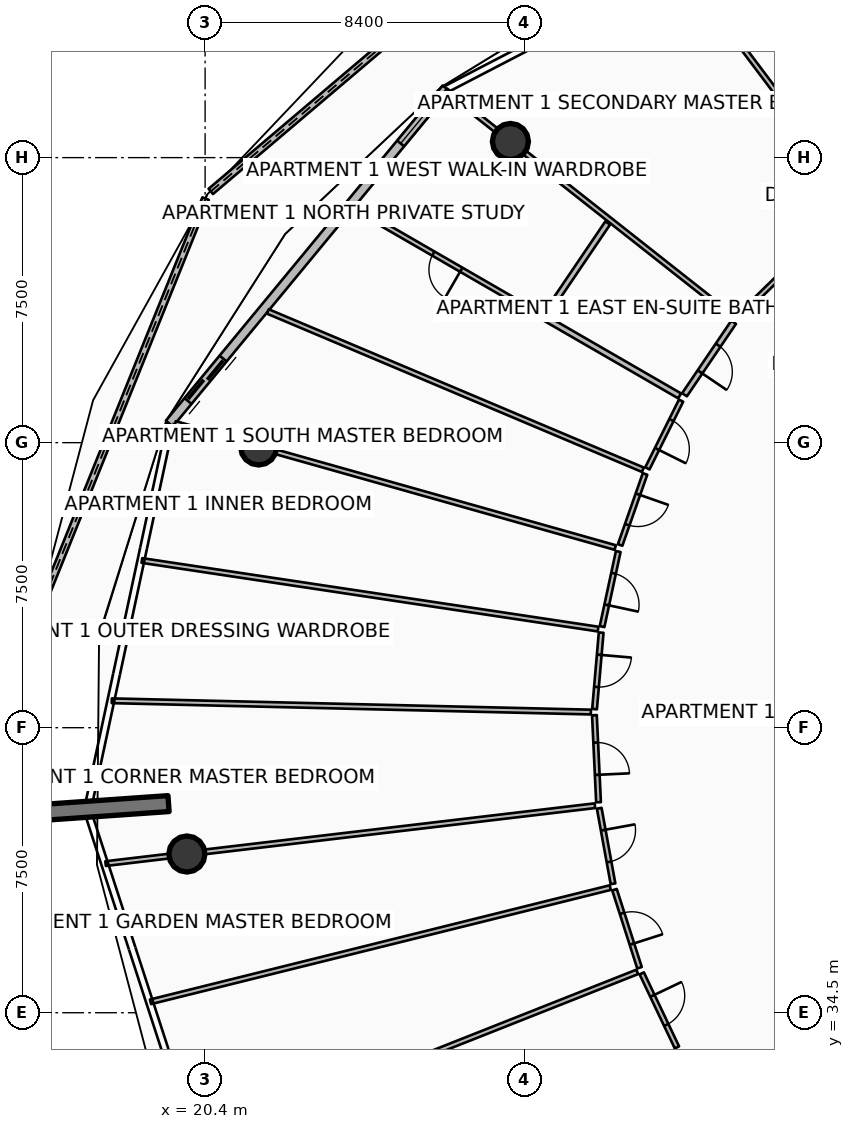
"""IFC4 building model, lengths in metres.
Left out: names, types, materials, properties, quantities, classifications, styles, units other than length and angle.
Written with IfcOpenShell. Run it as: python <this file> out.ifc"""

import sys

from ifc_helpers import new_model, si_unit, direction, frame, frame_2d, origin, origin_2d, place, context, subcontext, project, spatial, polyline, rectangle, circle, outline, extrude, element, fill, save


model = new_model("IFC4")
c1 = context("Model", 3, precision=1e-05, world=origin(), true_north=direction((0.0, 1.0)))
c2 = subcontext(c1, "Body", "Model", "MODEL_VIEW")
j1 = project(units=[si_unit("LENGTHUNIT", "METRE"), si_unit("PLANEANGLEUNIT", "RADIAN")], contexts=[c1])
p1 = place(None, origin())
s1 = spatial("IfcSite", under=j1, at=p1, CompositionType="ELEMENT")
p2 = place(p1, origin())
s2 = spatial("IfcBuilding", under=s1, at=p2, CompositionType="ELEMENT")
p3 = place(p2, frame((0.0, 0.0, 271.35)))
s3 = spatial("IfcBuildingStorey", under=s2, at=p3, CompositionType="ELEMENT", Elevation=271.35)
p4 = place(p3, frame((19.438, 40.003, 0.0), z_axis=(0.0, 0.0, 1.0), x_axis=(-0.997563824095, -0.069759707979, 0.0)))
e1 = element("IfcWall", 1, at=p4, inside=s3, PredefinedType="SOLIDWALL", context=c2, shape_type="SweptSolid", body=[
    extrude(rectangle(XDim=3.5, YDim=0.42, at=frame_2d((1.75, 0.0))), origin(), (0.0, 0.0, 1.0), 3.85),
])
for number, where, z_axis, x_axis in (
    (2, (28.434, 57.425, 0.0), (0.0, 0.0, 1.0), (1.0, 0.0, 0.0)),
    (3, (21.809, 49.387, 0.0), (0.0, 0.0, 1.0), (1.0, 0.0, 0.0)),
    (4, (19.92, 38.677, 0.0), (0.0, 0.0, 1.0), (1.0, 0.0, 0.0)),
):
    element("IfcColumn", number, at=place(p3, frame(where, z_axis=z_axis, x_axis=x_axis)), inside=s3, PredefinedType="COLUMN", context=c2, shape_type="SweptSolid", body=[
        extrude(circle(Radius=0.475, at=origin_2d()), origin(), (0.0, 0.0, 1.0), 3.59),
    ])
p5 = place(p3, frame((29.348, 63.571, 0.0), z_axis=(0.0, 0.0, 1.0), x_axis=(-0.762735629532, -0.646710413896, 0.0)))
e5 = element("IfcWall", 5, at=p5, inside=s3, PredefinedType="PARAPET", context=c2, shape_type="SweptSolid", body=[
    extrude(outline(polyline([(0.0, 0.0), (11.535, 0.0), (11.535, 1.632), (5.768, 1.798), (0.0, 1.86), (0.0, 0.0)])), frame((0.0, 0.09, 0.0), z_axis=(0.0, -1.0, 0.0), x_axis=(1.0, 0.0, 0.0)), (0.0, 0.0, 1.0), 0.18),
])
p6 = place(p3, frame((20.413, 55.922, 0.0), z_axis=(0.0, 0.0, 1.0), x_axis=(-0.374094279698, -0.927390678138, 0.0)))
e6 = element("IfcWall", 6, at=p6, inside=s3, PredefinedType="PARAPET", context=c2, shape_type="SweptSolid", body=[
    extrude(outline(polyline([(0.0, 0.0), (12.075, 0.0), (12.075, 1.233), (6.037, 1.418), (0.0, 1.632), (0.0, 0.0)])), frame((0.0, 0.09, 0.0), z_axis=(0.0, -1.0, 0.0), x_axis=(1.0, 0.0, 0.0)), (0.0, 0.0, 1.0), 0.18),
])
p7 = place(p3, frame((26.742, 58.822, 0.0), z_axis=(0.0, 0.0, 1.0), x_axis=(-0.636680093065, -0.771128043255, 0.0)))
e7 = element("IfcWall", 7, at=p7, inside=s3, PredefinedType="SOLIDWALL", context=c2, shape_type="SweptSolid", body=[
    extrude(rectangle(XDim=11.438, YDim=0.24, at=frame_2d((5.719, 0.0))), origin(), (0.0, 0.0, 1.0), 2.54),
])
p8 = place(p7, frame((9.218, 0.0, 0.0)))
e8 = element("IfcOpeningElement", 8, at=p8, cuts=e7, PredefinedType="OPENING", context=c2, shape_type="SweptSolid", body=[
    extrude(rectangle(XDim=1.45, YDim=2.15, at=frame_2d((0.725, 1.075))), frame((0.0, 0.13, 0.0), z_axis=(0.0, -1.0, 0.0), x_axis=(1.0, 0.0, 0.0)), (0.0, 0.0, 1.0), 0.26),
])
p9 = place(p7, frame((0.28, 0.0, 0.65)))
e9 = element("IfcOpeningElement", 9, at=p9, cuts=e7, PredefinedType="OPENING", context=c2, shape_type="SweptSolid", body=[
    extrude(rectangle(XDim=1.6, YDim=1.5, at=frame_2d((0.8, 0.75))), frame((0.0, 0.13, 0.0), z_axis=(0.0, -1.0, 0.0), x_axis=(1.0, 0.0, 0.0)), (0.0, 0.0, 1.0), 0.26),
])
p10 = place(p3, frame((37.509, 55.949, 0.0), z_axis=(0.0, 0.0, 1.0), x_axis=(-0.60104674722, 0.799213868534, 0.0)))
e10 = element("IfcWall", 10, at=p10, inside=s3, PredefinedType="PARTITIONING", context=c2, shape_type="SweptSolid", body=[
    extrude(rectangle(XDim=7.572, YDim=0.125, at=frame_2d((3.786, 0.0))), origin(), (0.0, 0.0, 1.0), 3.03),
])
p11 = place(p3, frame((37.506, 55.822, 0.0), z_axis=(0.0, 0.0, 1.0), x_axis=(-0.715105814901, -0.699016218334, 0.0)))
e11 = element("IfcWall", 11, at=p11, inside=s3, PredefinedType="PARTITIONING", context=c2, shape_type="SweptSolid", body=[
    extrude(rectangle(XDim=4.294, YDim=0.125, at=frame_2d((2.147, 0.0))), origin(), (0.0, 0.0, 1.0), 2.957),
])
p12 = place(p11, frame((1.697, 0.0, 0.0)))
e12 = element("IfcOpeningElement", 12, at=p12, cuts=e11, PredefinedType="OPENING", context=c2, shape_type="SweptSolid", body=[
    extrude(rectangle(XDim=0.9, YDim=2.08, at=frame_2d((0.45, 1.04))), frame((0.0, 0.073, 0.0), z_axis=(0.0, -1.0, 0.0), x_axis=(1.0, 0.0, 0.0)), (0.0, 0.0, 1.0), 0.145),
])
p13 = place(p3, frame((34.285, 52.812, 0.0), z_axis=(0.0, 0.0, 1.0), x_axis=(-0.785324921183, 0.619083813526, 0.0)))
e13 = element("IfcWall", 13, at=p13, inside=s3, PredefinedType="PARTITIONING", context=c2, shape_type="SweptSolid", body=[
    extrude(rectangle(XDim=9.621, YDim=0.125, at=frame_2d((4.811, 0.0))), origin(), (0.0, 0.0, 1.0), 2.957),
])
p14 = place(p3, frame((34.308, 52.667, 0.0), z_axis=(0.0, 0.0, 1.0), x_axis=(-0.561141072409, -0.827720180288, 0.0)))
e14 = element("IfcWall", 14, at=p14, inside=s3, PredefinedType="PARTITIONING", context=c2, shape_type="SweptSolid", body=[
    extrude(rectangle(XDim=2.303, YDim=0.15, at=frame_2d((1.152, 0.0))), origin(), (0.0, 0.0, 1.0), 2.957),
])
p15 = place(p14, frame((0.727, 0.0, 0.0)))
e15 = element("IfcOpeningElement", 15, at=p15, cuts=e14, PredefinedType="OPENING", context=c2, shape_type="SweptSolid", body=[
    extrude(rectangle(XDim=0.85, YDim=2.06, at=frame_2d((0.425, 1.03))), frame((0.0, 0.085, 0.0), z_axis=(0.0, -1.0, 0.0), x_axis=(1.0, 0.0, 0.0)), (0.0, 0.0, 1.0), 0.17),
])
p16 = place(p3, frame((30.994, 55.28, 0.0), z_axis=(0.0, 0.0, 1.0), x_axis=(-0.561093021969, -0.827752753361, 0.0)))
e16 = element("IfcWall", 16, at=p16, inside=s3, PredefinedType="PARTITIONING", context=c2, shape_type="SweptSolid", body=[
    extrude(rectangle(XDim=2.91, YDim=0.15, at=frame_2d((1.455, 0.0))), origin(), (0.0, 0.0, 1.0), 2.957),
])
p17 = place(p3, frame((32.887, 50.731, 0.0), z_axis=(0.0, 0.0, 1.0), x_axis=(-0.865897249189, 0.500221904605, 0.0)))
e17 = element("IfcWall", 17, at=p17, inside=s3, PredefinedType="PARTITIONING", context=c2, shape_type="SweptSolid", body=[
    extrude(rectangle(XDim=4.09, YDim=0.15, at=frame_2d((2.045, 0.0))), origin(), (0.0, 0.0, 1.0), 3.03),
])
p18 = place(p3, frame((29.233, 52.842, 0.0), z_axis=(0.0, 0.0, 1.0), x_axis=(-0.865885749935, 0.500241809588, 0.0)))
e18 = element("IfcWall", 18, at=p18, inside=s3, PredefinedType="PARTITIONING", context=c2, shape_type="SweptSolid", body=[
    extrude(rectangle(XDim=5.683, YDim=0.125, at=frame_2d((2.841, 0.0))), origin(), (0.0, 0.0, 1.0), 3.03),
])
p19 = place(p18, frame((2.417, 0.0, 0.0)))
e19 = element("IfcOpeningElement", 19, at=p19, cuts=e18, PredefinedType="OPENING", context=c2, shape_type="SweptSolid", body=[
    extrude(rectangle(XDim=0.85, YDim=2.06, at=frame_2d((0.425, 1.03))), frame((0.0, 0.073, 0.0), z_axis=(0.0, -1.0, 0.0), x_axis=(1.0, 0.0, 0.0)), (0.0, 0.0, 1.0), 0.145),
])
p20 = place(p3, frame((31.92, 48.787, 0.0), z_axis=(0.0, 0.0, 1.0), x_axis=(-0.92130726737, 0.388835336731, 0.0)))
e20 = element("IfcWall", 20, at=p20, inside=s3, PredefinedType="PARTITIONING", context=c2, shape_type="SweptSolid", body=[
    extrude(rectangle(XDim=10.712, YDim=0.125, at=frame_2d((5.356, 0.0))), origin(), (0.0, 0.0, 1.0), 3.03),
])
p21 = place(p3, frame((32.925, 50.605, 0.0), z_axis=(0.0, 0.0, 1.0), x_axis=(-0.445446150764, -0.895308732656, 0.0)))
e21 = element("IfcWall", 21, at=p21, inside=s3, PredefinedType="PARTITIONING", context=c2, shape_type="SweptSolid", body=[
    extrude(rectangle(XDim=1.99, YDim=0.125, at=frame_2d((0.995, 0.0))), origin(), (0.0, 0.0, 1.0), 3.03),
])
p22 = place(p21, frame((0.57, 0.0, 0.0)))
e22 = element("IfcOpeningElement", 22, at=p22, cuts=e21, PredefinedType="OPENING", context=c2, shape_type="SweptSolid", body=[
    extrude(rectangle(XDim=0.85, YDim=2.06, at=frame_2d((0.425, 1.03))), frame((0.0, 0.073, 0.0), z_axis=(0.0, -1.0, 0.0), x_axis=(1.0, 0.0, 0.0)), (0.0, 0.0, 1.0), 0.145),
])
p23 = place(p3, frame((31.976, 48.677, 0.0), z_axis=(0.0, 0.0, 1.0), x_axis=(-0.330762244327, -0.943714118644, 0.0)))
e23 = element("IfcWall", 23, at=p23, inside=s3, PredefinedType="PARTITIONING", context=c2, shape_type="SweptSolid", body=[
    extrude(rectangle(XDim=1.98, YDim=0.125, at=frame_2d((0.99, 0.0))), origin(), (0.0, 0.0, 1.0), 2.957),
])
p24 = place(p23, frame((0.565, 0.0, 0.0)))
e24 = element("IfcOpeningElement", 24, at=p24, cuts=e23, PredefinedType="OPENING", context=c2, shape_type="SweptSolid", body=[
    extrude(rectangle(XDim=0.85, YDim=2.06, at=frame_2d((0.425, 1.03))), frame((0.0, 0.073, 0.0), z_axis=(0.0, -1.0, 0.0), x_axis=(1.0, 0.0, 0.0)), (0.0, 0.0, 1.0), 0.145),
])
p25 = place(p3, frame((31.192, 46.74, 0.0), z_axis=(0.0, 0.0, 1.0), x_axis=(-0.962454841417, 0.271441850554, 0.0)))
e25 = element("IfcWall", 25, at=p25, inside=s3, PredefinedType="PARTITIONING", context=c2, shape_type="SweptSolid", body=[
    extrude(rectangle(XDim=12.031, YDim=0.125, at=frame_2d((6.016, 0.0))), origin(), (0.0, 0.0, 1.0), 2.957),
])
p26 = place(p3, frame((30.74, 44.595, 0.0), z_axis=(0.0, 0.0, 1.0), x_axis=(-0.988886285118, 0.148673854813, 0.0)))
e26 = element("IfcWall", 26, at=p26, inside=s3, PredefinedType="PARTITIONING", context=c2, shape_type="SweptSolid", body=[
    extrude(rectangle(XDim=12.139, YDim=0.125, at=frame_2d((6.069, 0.0))), origin(), (0.0, 0.0, 1.0), 3.03),
])
p27 = place(p3, frame((30.551, 42.411, 0.0), z_axis=(0.0, 0.0, 1.0), x_axis=(-0.999722360085, 0.023562740626, 0.0)))
e27 = element("IfcWall", 27, at=p27, inside=s3, PredefinedType="PARTITIONING", context=c2, shape_type="SweptSolid", body=[
    extrude(rectangle(XDim=12.61, YDim=0.125, at=frame_2d((6.305, 0.0))), origin(), (0.0, 0.0, 1.0), 3.03),
])
p28 = place(p3, frame((31.271, 46.635, 0.0), z_axis=(0.0, 0.0, 1.0), x_axis=(-0.210477911791, -0.97759861326, 0.0)))
e28 = element("IfcWall", 28, at=p28, inside=s3, PredefinedType="PARTITIONING", context=c2, shape_type="SweptSolid", body=[
    extrude(rectangle(XDim=2.021, YDim=0.125, at=frame_2d((1.01, 0.0))), origin(), (0.0, 0.0, 1.0), 2.957),
])
p29 = place(p28, frame((0.585, 0.0, 0.0)))
e29 = element("IfcOpeningElement", 29, at=p29, cuts=e28, PredefinedType="OPENING", context=c2, shape_type="SweptSolid", body=[
    extrude(rectangle(XDim=0.85, YDim=2.06, at=frame_2d((0.425, 1.03))), frame((0.0, 0.073, 0.0), z_axis=(0.0, -1.0, 0.0), x_axis=(1.0, 0.0, 0.0)), (0.0, 0.0, 1.0), 0.145),
])
p30 = place(p3, frame((30.822, 44.502, 0.0), z_axis=(0.0, 0.0, 1.0), x_axis=(-0.086275045339, -0.996271356886, 0.0)))
e30 = element("IfcWall", 30, at=p30, inside=s3, PredefinedType="PARTITIONING", context=c2, shape_type="SweptSolid", body=[
    extrude(rectangle(XDim=2.021, YDim=0.125, at=frame_2d((1.01, 0.0))), origin(), (0.0, 0.0, 1.0), 3.03),
])
p31 = place(p30, frame((0.585, 0.0, 0.0)))
e31 = element("IfcOpeningElement", 31, at=p31, cuts=e30, PredefinedType="OPENING", context=c2, shape_type="SweptSolid", body=[
    extrude(rectangle(XDim=0.85, YDim=2.06, at=frame_2d((0.425, 1.03))), frame((0.0, 0.073, 0.0), z_axis=(0.0, -1.0, 0.0), x_axis=(1.0, 0.0, 0.0)), (0.0, 0.0, 1.0), 0.145),
])
p32 = place(p3, frame((30.645, 42.329, 0.0), z_axis=(0.0, 0.0, 1.0), x_axis=(0.047175561804, -0.998886613369, 0.0)))
e32 = element("IfcWall", 32, at=p32, inside=s3, PredefinedType="PARTITIONING", context=c2, shape_type="SweptSolid", body=[
    extrude(rectangle(XDim=2.292, YDim=0.125, at=frame_2d((1.146, 0.0))), origin(), (0.0, 0.0, 1.0), 2.957),
])
p33 = place(p32, frame((0.721, 0.0, 0.0)))
e33 = element("IfcOpeningElement", 33, at=p33, cuts=e32, PredefinedType="OPENING", context=c2, shape_type="SweptSolid", body=[
    extrude(rectangle(XDim=0.85, YDim=2.06, at=frame_2d((0.425, 1.03))), frame((0.0, 0.073, 0.0), z_axis=(0.0, -1.0, 0.0), x_axis=(1.0, 0.0, 0.0)), (0.0, 0.0, 1.0), 0.145),
])
p34 = place(p3, frame((30.657, 39.947, 0.0), z_axis=(0.0, 0.0, 1.0), x_axis=(-0.99306861519, -0.117536060525, 0.0)))
e34 = element("IfcWall", 34, at=p34, inside=s3, PredefinedType="PARTITIONING", context=c2, shape_type="SweptSolid", body=[
    extrude(rectangle(XDim=12.966, YDim=0.125, at=frame_2d((6.483, 0.0))), origin(), (0.0, 0.0, 1.0), 2.957),
])
p35 = place(p3, frame((31.061, 37.792, 0.0), z_axis=(0.0, 0.0, 1.0), x_axis=(-0.970505468857, -0.241079105105, 0.0)))
e35 = element("IfcWall", 35, at=p35, inside=s3, PredefinedType="PARTITIONING", context=c2, shape_type="SweptSolid", body=[
    extrude(rectangle(XDim=12.465, YDim=0.125, at=frame_2d((6.233, 0.0))), origin(), (0.0, 0.0, 1.0), 3.03),
])
p36 = place(p3, frame((31.772, 35.575, 0.0), z_axis=(0.0, 0.0, 1.0), x_axis=(-0.929777389871, -0.368122269476, 0.0)))
e36 = element("IfcWall", 36, at=p36, inside=s3, PredefinedType="PARTITIONING", context=c2, shape_type="SweptSolid", body=[
    extrude(rectangle(XDim=12.45, YDim=0.125, at=frame_2d((6.225, 0.0))), origin(), (0.0, 0.0, 1.0), 3.03),
])
p37 = place(p3, frame((30.771, 39.88, 0.0), z_axis=(0.0, 0.0, 1.0), x_axis=(0.17966153972, -0.983728484464, 0.0)))
e37 = element("IfcWall", 37, at=p37, inside=s3, PredefinedType="PARTITIONING", context=c2, shape_type="SweptSolid", body=[
    extrude(rectangle(XDim=2.021, YDim=0.125, at=frame_2d((1.01, 0.0))), origin(), (0.0, 0.0, 1.0), 2.957),
])
p38 = place(p37, frame((0.585, 0.0, 0.0)))
e38 = element("IfcOpeningElement", 38, at=p38, cuts=e37, PredefinedType="OPENING", context=c2, shape_type="SweptSolid", body=[
    extrude(rectangle(XDim=0.85, YDim=2.06, at=frame_2d((0.425, 1.03))), frame((0.0, 0.073, 0.0), z_axis=(0.0, -1.0, 0.0), x_axis=(1.0, 0.0, 0.0)), (0.0, 0.0, 1.0), 0.145),
])
p39 = place(p3, frame((31.173, 37.738, 0.0), z_axis=(0.0, 0.0, 1.0), x_axis=(0.305305543728, -0.952254443397, 0.0)))
e39 = element("IfcWall", 39, at=p39, inside=s3, PredefinedType="PARTITIONING", context=c2, shape_type="SweptSolid", body=[
    extrude(rectangle(XDim=2.157, YDim=0.125, at=frame_2d((1.078, 0.0))), origin(), (0.0, 0.0, 1.0), 3.03),
])
p40 = place(p39, frame((0.653, 0.0, 0.0)))
e40 = element("IfcOpeningElement", 40, at=p40, cuts=e39, PredefinedType="OPENING", context=c2, shape_type="SweptSolid", body=[
    extrude(rectangle(XDim=0.85, YDim=2.06, at=frame_2d((0.425, 1.03))), frame((0.0, 0.073, 0.0), z_axis=(0.0, -1.0, 0.0), x_axis=(1.0, 0.0, 0.0)), (0.0, 0.0, 1.0), 0.145),
])
p41 = place(p3, frame((31.89, 35.536, 0.0), z_axis=(0.0, 0.0, 1.0), x_axis=(0.429375439277, -0.90312608873, 0.0)))
e41 = element("IfcWall", 41, at=p41, inside=s3, PredefinedType="PARTITIONING", context=c2, shape_type="SweptSolid", body=[
    extrude(rectangle(XDim=2.157, YDim=0.125, at=frame_2d((1.078, 0.0))), origin(), (0.0, 0.0, 1.0), 2.957),
])
p42 = place(p41, frame((0.653, 0.0, 0.0)))
e42 = element("IfcOpeningElement", 42, at=p42, cuts=e41, PredefinedType="OPENING", context=c2, shape_type="SweptSolid", body=[
    extrude(rectangle(XDim=0.85, YDim=2.06, at=frame_2d((0.425, 1.03))), frame((0.0, 0.073, 0.0), z_axis=(0.0, -1.0, 0.0), x_axis=(1.0, 0.0, 0.0)), (0.0, 0.0, 1.0), 0.145),
])
p43 = place(p8, origin())
e43 = element("IfcDoor", 43, at=p43, inside=s3, OperationType="DOUBLE_DOOR_SLIDING", PredefinedType="DOOR", context=c2, shape_type="SweptSolid", body=[
    extrude(rectangle(XDim=1.45, YDim=2.15, at=frame_2d((0.725, 1.075))), frame((0.0, 0.025, 0.0), z_axis=(0.0, -1.0, 0.0), x_axis=(1.0, 0.0, 0.0)), (0.0, 0.0, 1.0), 0.05),
])
fill(e8, e43)
p44 = place(p9, origin())
e44 = element("IfcWindow", 44, at=p44, inside=s3, PartitioningType="SINGLE_PANEL", PredefinedType="WINDOW", context=c2, shape_type="SweptSolid", body=[
    extrude(rectangle(XDim=1.6, YDim=1.5, at=frame_2d((0.8, 0.75))), frame((0.0, 0.03, 0.0), z_axis=(0.0, -1.0, 0.0), x_axis=(1.0, 0.0, 0.0)), (0.0, 0.0, 1.0), 0.06),
])
fill(e9, e44)
p45 = place(p15, origin())
e45 = element("IfcDoor", 45, at=p45, inside=s3, OperationType="SINGLE_SWING_RIGHT", PredefinedType="DOOR", context=c2, shape_type="SweptSolid", body=[
    extrude(rectangle(XDim=0.85, YDim=2.06, at=frame_2d((0.425, 1.03))), frame((0.0, 0.025, 0.0), z_axis=(0.0, -1.0, 0.0), x_axis=(1.0, 0.0, 0.0)), (0.0, 0.0, 1.0), 0.05),
])
fill(e15, e45)
p46 = place(p19, origin())
e46 = element("IfcDoor", 46, at=p46, inside=s3, OperationType="SINGLE_SWING_LEFT", PredefinedType="DOOR", context=c2, shape_type="SweptSolid", body=[
    extrude(rectangle(XDim=0.85, YDim=2.06, at=frame_2d((0.425, 1.03))), frame((0.0, 0.025, 0.0), z_axis=(0.0, -1.0, 0.0), x_axis=(1.0, 0.0, 0.0)), (0.0, 0.0, 1.0), 0.05),
])
fill(e19, e46)
p47 = place(p22, origin())
e47 = element("IfcDoor", 47, at=p47, inside=s3, OperationType="SINGLE_SWING_RIGHT", PredefinedType="DOOR", context=c2, shape_type="SweptSolid", body=[
    extrude(rectangle(XDim=0.85, YDim=2.06, at=frame_2d((0.425, 1.03))), frame((0.0, 0.025, 0.0), z_axis=(0.0, -1.0, 0.0), x_axis=(1.0, 0.0, 0.0)), (0.0, 0.0, 1.0), 0.05),
])
fill(e22, e47)
p48 = place(p24, origin())
e48 = element("IfcDoor", 48, at=p48, inside=s3, OperationType="SINGLE_SWING_LEFT", PredefinedType="DOOR", context=c2, shape_type="SweptSolid", body=[
    extrude(rectangle(XDim=0.85, YDim=2.06, at=frame_2d((0.425, 1.03))), frame((0.0, 0.025, 0.0), z_axis=(0.0, -1.0, 0.0), x_axis=(1.0, 0.0, 0.0)), (0.0, 0.0, 1.0), 0.05),
])
fill(e24, e48)
p49 = place(p29, origin())
e49 = element("IfcDoor", 49, at=p49, inside=s3, OperationType="SINGLE_SWING_RIGHT", PredefinedType="DOOR", context=c2, shape_type="SweptSolid", body=[
    extrude(rectangle(XDim=0.85, YDim=2.06, at=frame_2d((0.425, 1.03))), frame((0.0, 0.025, 0.0), z_axis=(0.0, -1.0, 0.0), x_axis=(1.0, 0.0, 0.0)), (0.0, 0.0, 1.0), 0.05),
])
fill(e29, e49)
p50 = place(p31, origin())
e50 = element("IfcDoor", 50, at=p50, inside=s3, OperationType="SINGLE_SWING_LEFT", PredefinedType="DOOR", context=c2, shape_type="SweptSolid", body=[
    extrude(rectangle(XDim=0.85, YDim=2.06, at=frame_2d((0.425, 1.03))), frame((0.0, 0.025, 0.0), z_axis=(0.0, -1.0, 0.0), x_axis=(1.0, 0.0, 0.0)), (0.0, 0.0, 1.0), 0.05),
])
fill(e31, e50)
p51 = place(p33, origin())
e51 = element("IfcDoor", 51, at=p51, inside=s3, OperationType="SINGLE_SWING_RIGHT", PredefinedType="DOOR", context=c2, shape_type="SweptSolid", body=[
    extrude(rectangle(XDim=0.85, YDim=2.06, at=frame_2d((0.425, 1.03))), frame((0.0, 0.025, 0.0), z_axis=(0.0, -1.0, 0.0), x_axis=(1.0, 0.0, 0.0)), (0.0, 0.0, 1.0), 0.05),
])
fill(e33, e51)
p52 = place(p38, origin())
e52 = element("IfcDoor", 52, at=p52, inside=s3, OperationType="SINGLE_SWING_LEFT", PredefinedType="DOOR", context=c2, shape_type="SweptSolid", body=[
    extrude(rectangle(XDim=0.85, YDim=2.06, at=frame_2d((0.425, 1.03))), frame((0.0, 0.025, 0.0), z_axis=(0.0, -1.0, 0.0), x_axis=(1.0, 0.0, 0.0)), (0.0, 0.0, 1.0), 0.05),
])
fill(e38, e52)
p53 = place(p40, origin())
e53 = element("IfcDoor", 53, at=p53, inside=s3, OperationType="SINGLE_SWING_RIGHT", PredefinedType="DOOR", context=c2, shape_type="SweptSolid", body=[
    extrude(rectangle(XDim=0.85, YDim=2.06, at=frame_2d((0.425, 1.03))), frame((0.0, 0.025, 0.0), z_axis=(0.0, -1.0, 0.0), x_axis=(1.0, 0.0, 0.0)), (0.0, 0.0, 1.0), 0.05),
])
fill(e40, e53)
p54 = place(p42, origin())
e54 = element("IfcDoor", 54, at=p54, inside=s3, OperationType="SINGLE_SWING_LEFT", PredefinedType="DOOR", context=c2, shape_type="SweptSolid", body=[
    extrude(rectangle(XDim=0.85, YDim=2.06, at=frame_2d((0.425, 1.03))), frame((0.0, 0.025, 0.0), z_axis=(0.0, -1.0, 0.0), x_axis=(1.0, 0.0, 0.0)), (0.0, 0.0, 1.0), 0.05),
])
fill(e42, e54)
save(model, sys.argv[1])
